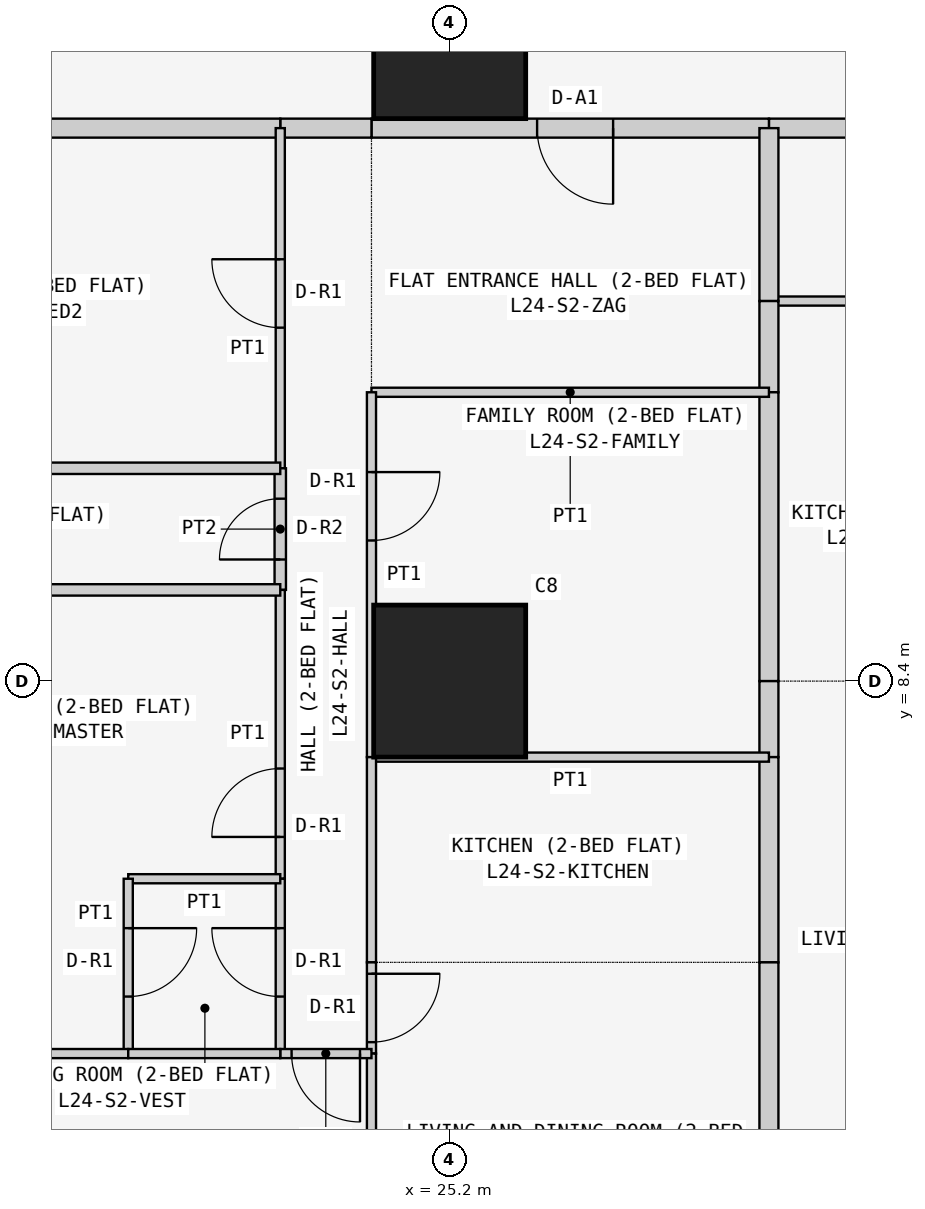
"""IFC4 building model, lengths in metres.
Left out: names, types, materials, properties, quantities, classifications, styles, units other than length and angle.
Written with IfcOpenShell. Run it as: python <this file> out.ifc"""

import sys

from ifc_helpers import new_model, si_unit, direction, frame, frame_2d, origin, origin_2d, place, context, subcontext, project, spatial, rectangle, extrude, element, fill, save


model = new_model("IFC4")
c1 = context("Model", 3, precision=1e-05, world=origin(), true_north=direction((0.0, 1.0)))
c2 = subcontext(c1, "Body", "Model", "MODEL_VIEW")
j1 = project(units=[si_unit("LENGTHUNIT", "METRE"), si_unit("PLANEANGLEUNIT", "RADIAN")], contexts=[c1])
p1 = place(None, origin())
s1 = spatial("IfcSite", under=j1, at=p1, CompositionType="ELEMENT")
p2 = place(p1, origin())
s2 = spatial("IfcBuilding", under=s1, at=p2, CompositionType="ELEMENT")
p3 = place(p2, frame((0.0, 0.0, 95.7)))
s3 = spatial("IfcBuildingStorey", under=s2, at=p3, CompositionType="ELEMENT", Elevation=95.7)
for number, where, z_axis, x_axis in (
    (1, (25.2, 8.4, 0.0), (0.0, 0.0, 1.0), (1.0, 0.0, 0.0)),
    (2, (25.2, 16.8, 0.0), (0.0, 0.0, 1.0), (1.0, 0.0, 0.0)),
):
    element("IfcColumn", number, at=place(p3, frame(where, z_axis=z_axis, x_axis=x_axis)), inside=s3, PredefinedType="COLUMN", context=c2, shape_type="SweptSolid", body=[
        extrude(rectangle(XDim=2.0, YDim=2.0, at=origin_2d()), origin(), (0.0, 0.0, 1.0), 3.6),
    ])
p4 = place(p3, frame((36.5, 15.675, 0.0), z_axis=(0.0, 0.0, 1.0), x_axis=(-1.0, 0.0, 0.0)))
e3 = element("IfcWall", 3, at=p4, inside=s3, PredefinedType="PARTITIONING", context=c2, shape_type="SweptSolid", body=[
    extrude(rectangle(XDim=7.1, YDim=0.25, at=frame_2d((3.55, 0.0))), origin(), (0.0, 0.0, 1.0), 3.45),
])
p5 = place(p4, frame((4.1, 0.0, 0.0)))
e4 = element("IfcOpeningElement", 4, at=p5, cuts=e3, PredefinedType="OPENING", context=c2, shape_type="SweptSolid", body=[
    extrude(rectangle(XDim=1.0, YDim=2.1, at=frame_2d((0.5, 1.05))), frame((0.0, 0.135, 0.0), z_axis=(0.0, -1.0, 0.0), x_axis=(1.0, 0.0, 0.0)), (0.0, 0.0, 1.0), 0.27),
])
p6 = place(p3, frame((29.4, 15.675, 0.0), z_axis=(0.0, 0.0, 1.0), x_axis=(-1.0, 0.0, 0.0)))
e5 = element("IfcWall", 5, at=p6, inside=s3, PredefinedType="PARTITIONING", context=c2, shape_type="SweptSolid", body=[
    extrude(rectangle(XDim=5.229, YDim=0.25, at=frame_2d((2.615, 0.0))), origin(), (0.0, 0.0, 1.0), 3.45),
])
p7 = place(p6, frame((2.05, 0.0, 0.0)))
e6 = element("IfcOpeningElement", 6, at=p7, cuts=e5, PredefinedType="OPENING", context=c2, shape_type="SweptSolid", body=[
    extrude(rectangle(XDim=1.0, YDim=2.1, at=frame_2d((0.5, 1.05))), frame((0.0, 0.135, 0.0), z_axis=(0.0, -1.0, 0.0), x_axis=(1.0, 0.0, 0.0)), (0.0, 0.0, 1.0), 0.27),
])
p8 = place(p3, frame((24.171, 15.675, 0.0), z_axis=(0.0, 0.0, 1.0), x_axis=(-1.0, 0.0, 0.0)))
e7 = element("IfcWall", 7, at=p8, inside=s3, PredefinedType="PARTITIONING", context=c2, shape_type="SweptSolid", body=[
    extrude(rectangle(XDim=1.2, YDim=0.25, at=frame_2d((0.6, 0.0))), origin(), (0.0, 0.0, 1.0), 3.45),
])
p9 = place(p3, frame((22.971, 15.675, 0.0), z_axis=(0.0, 0.0, 1.0), x_axis=(-1.0, 0.0, 0.0)))
e8 = element("IfcWall", 8, at=p9, inside=s3, PredefinedType="PARTITIONING", context=c2, shape_type="SweptSolid", body=[
    extrude(rectangle(XDim=6.871, YDim=0.25, at=frame_2d((3.436, 0.0))), origin(), (0.0, 0.0, 1.0), 3.45),
])
p10 = place(p3, frame((29.4, 13.4, 0.0), z_axis=(0.0, 0.0, 1.0), x_axis=(1.0, 0.0, 0.0)))
e9 = element("IfcWall", 9, at=p10, inside=s3, PredefinedType="PARTITIONING", context=c2, shape_type="SweptSolid", body=[
    extrude(rectangle(XDim=4.0, YDim=0.12, at=frame_2d((2.0, 0.0))), origin(), (0.0, 0.0, 1.0), 3.45),
])
p11 = place(p10, frame((1.05, 0.0, 0.0)))
e10 = element("IfcOpeningElement", 10, at=p11, cuts=e9, PredefinedType="OPENING", context=c2, shape_type="SweptSolid", body=[
    extrude(rectangle(XDim=0.9, YDim=2.1, at=frame_2d((0.45, 1.05))), frame((0.0, 0.07, 0.0), z_axis=(0.0, -1.0, 0.0), x_axis=(1.0, 0.0, 0.0)), (0.0, 0.0, 1.0), 0.14),
])
p12 = place(p3, frame((29.4, 15.675, 0.0), z_axis=(0.0, 0.0, 1.0), x_axis=(0.0, -1.0, 0.0)))
e11 = element("IfcWall", 11, at=p12, inside=s3, PredefinedType="PARTITIONING", context=c2, shape_type="SweptSolid", body=[
    extrude(rectangle(XDim=2.275, YDim=0.25, at=frame_2d((1.138, 0.0))), origin(), (0.0, 0.0, 1.0), 2.848),
])
p13 = place(p3, frame((29.4, 12.2, 0.0), z_axis=(0.0, 0.0, 1.0), x_axis=(0.0, 1.0, 0.0)))
e12 = element("IfcWall", 12, at=p13, inside=s3, PredefinedType="PARTITIONING", context=c2, shape_type="SweptSolid", body=[
    extrude(rectangle(XDim=1.2, YDim=0.25, at=frame_2d((0.6, 0.0))), origin(), (0.0, 0.0, 1.0), 2.848),
])
p14 = place(p3, frame((29.4, 8.4, 0.0), z_axis=(0.0, 0.0, 1.0), x_axis=(0.0, 1.0, 0.0)))
e13 = element("IfcWall", 13, at=p14, inside=s3, PredefinedType="PARTITIONING", context=c2, shape_type="SweptSolid", body=[
    extrude(rectangle(XDim=3.8, YDim=0.25, at=frame_2d((1.9, 0.0))), origin(), (0.0, 0.0, 1.0), 2.848),
])
p15 = place(p3, frame((29.4, 7.4, 0.0), z_axis=(0.0, 0.0, 1.0), x_axis=(0.0, 1.0, 0.0)))
e14 = element("IfcWall", 14, at=p15, inside=s3, PredefinedType="PARTITIONING", context=c2, shape_type="SweptSolid", body=[
    extrude(rectangle(XDim=1.0, YDim=0.25, at=frame_2d((0.5, 0.0))), origin(), (0.0, 0.0, 1.0), 2.848),
])
p16 = place(p3, frame((29.4, 4.7, 0.0), z_axis=(0.0, 0.0, 1.0), x_axis=(0.0, 1.0, 0.0)))
e15 = element("IfcWall", 15, at=p16, inside=s3, PredefinedType="PARTITIONING", context=c2, shape_type="SweptSolid", body=[
    extrude(rectangle(XDim=2.7, YDim=0.25, at=frame_2d((1.35, 0.0))), origin(), (0.0, 0.0, 1.0), 2.848),
])
p17 = place(p3, frame((29.4, -0.65, 0.0), z_axis=(0.0, 0.0, 1.0), x_axis=(0.0, 1.0, 0.0)))
e16 = element("IfcWall", 16, at=p17, inside=s3, PredefinedType="PARTITIONING", context=c2, shape_type="SweptSolid", body=[
    extrude(rectangle(XDim=5.35, YDim=0.25, at=frame_2d((2.675, 0.0))), origin(), (0.0, 0.0, 1.0), 2.848),
])
for number, where, z_axis, x_axis in (
    (17, (29.4, 12.2, 0.0), (0.0, 0.0, 1.0), (-1.0, 0.0, 0.0)),
    (18, (29.4, 7.4, 0.0), (0.0, 0.0, 1.0), (-1.0, 0.0, 0.0)),
):
    element("IfcWall", number, at=place(p3, frame(where, z_axis=z_axis, x_axis=x_axis)), inside=s3, PredefinedType="PARTITIONING", context=c2, shape_type="SweptSolid", body=[
        extrude(rectangle(XDim=5.229, YDim=0.12, at=frame_2d((2.615, 0.0))), origin(), (0.0, 0.0, 1.0), 3.45),
    ])
p18 = place(p3, frame((24.171, 7.4, 0.0), z_axis=(0.0, 0.0, 1.0), x_axis=(0.0, 1.0, 0.0)))
e19 = element("IfcWall", 19, at=p18, inside=s3, PredefinedType="PARTITIONING", context=c2, shape_type="SweptSolid", body=[
    extrude(rectangle(XDim=4.8, YDim=0.12, at=frame_2d((2.4, 0.0))), origin(), (0.0, 0.0, 1.0), 3.45),
])
p19 = place(p18, frame((2.85, 0.0, 0.0)))
e20 = element("IfcOpeningElement", 20, at=p19, cuts=e19, PredefinedType="OPENING", context=c2, shape_type="SweptSolid", body=[
    extrude(rectangle(XDim=0.9, YDim=2.1, at=frame_2d((0.45, 1.05))), frame((0.0, 0.07, 0.0), z_axis=(0.0, -1.0, 0.0), x_axis=(1.0, 0.0, 0.0)), (0.0, 0.0, 1.0), 0.14),
])
p20 = place(p3, frame((24.171, 4.7, 0.0), z_axis=(0.0, 0.0, 1.0), x_axis=(0.0, 1.0, 0.0)))
e21 = element("IfcWall", 21, at=p20, inside=s3, PredefinedType="PARTITIONING", context=c2, shape_type="SweptSolid", body=[
    extrude(rectangle(XDim=2.7, YDim=0.12, at=frame_2d((1.35, 0.0))), origin(), (0.0, 0.0, 1.0), 3.45),
])
p21 = place(p3, frame((24.171, 3.5, 0.0), z_axis=(0.0, 0.0, 1.0), x_axis=(0.0, 1.0, 0.0)))
e22 = element("IfcWall", 22, at=p21, inside=s3, PredefinedType="PARTITIONING", context=c2, shape_type="SweptSolid", body=[
    extrude(rectangle(XDim=1.2, YDim=0.12, at=frame_2d((0.6, 0.0))), origin(), (0.0, 0.0, 1.0), 3.45),
])
p22 = place(p21, frame((0.15, 0.0, 0.0)))
e23 = element("IfcOpeningElement", 23, at=p22, cuts=e22, PredefinedType="OPENING", context=c2, shape_type="SweptSolid", body=[
    extrude(rectangle(XDim=0.9, YDim=2.1, at=frame_2d((0.45, 1.05))), frame((0.0, 0.07, 0.0), z_axis=(0.0, -1.0, 0.0), x_axis=(1.0, 0.0, 0.0)), (0.0, 0.0, 1.0), 0.14),
])
p23 = place(p3, frame((24.171, -0.65, 0.0), z_axis=(0.0, 0.0, 1.0), x_axis=(0.0, 1.0, 0.0)))
e24 = element("IfcWall", 24, at=p23, inside=s3, PredefinedType="PARTITIONING", context=c2, shape_type="SweptSolid", body=[
    extrude(rectangle(XDim=4.15, YDim=0.12, at=frame_2d((2.075, 0.0))), origin(), (0.0, 0.0, 1.0), 3.45),
])
p24 = place(p3, frame((22.971, 11.2, 0.0), z_axis=(0.0, 0.0, 1.0), x_axis=(0.0, 1.0, 0.0)))
e25 = element("IfcWall", 25, at=p24, inside=s3, PredefinedType="PARTITIONING", context=c2, shape_type="SweptSolid", body=[
    extrude(rectangle(XDim=4.475, YDim=0.12, at=frame_2d((2.238, 0.0))), origin(), (0.0, 0.0, 1.0), 3.45),
])
p25 = place(p24, frame((1.85, 0.0, 0.0)))
e26 = element("IfcOpeningElement", 26, at=p25, cuts=e25, PredefinedType="OPENING", context=c2, shape_type="SweptSolid", body=[
    extrude(rectangle(XDim=0.9, YDim=2.1, at=frame_2d((0.45, 1.05))), frame((0.0, 0.07, 0.0), z_axis=(0.0, -1.0, 0.0), x_axis=(1.0, 0.0, 0.0)), (0.0, 0.0, 1.0), 0.14),
])
p26 = place(p3, frame((22.971, 9.6, 0.0), z_axis=(0.0, 0.0, 1.0), x_axis=(0.0, 1.0, 0.0)))
e27 = element("IfcWall", 27, at=p26, inside=s3, PredefinedType="PARTITIONING", context=c2, shape_type="SweptSolid", body=[
    extrude(rectangle(XDim=1.6, YDim=0.15, at=frame_2d((0.8, 0.0))), origin(), (0.0, 0.0, 1.0), 3.45),
])
p27 = place(p26, frame((0.4, 0.0, 0.0)))
e28 = element("IfcOpeningElement", 28, at=p27, cuts=e27, PredefinedType="OPENING", context=c2, shape_type="SweptSolid", body=[
    extrude(rectangle(XDim=0.8, YDim=2.1, at=frame_2d((0.4, 1.05))), frame((0.0, 0.085, 0.0), z_axis=(0.0, -1.0, 0.0), x_axis=(1.0, 0.0, 0.0)), (0.0, 0.0, 1.0), 0.17),
])
p28 = place(p3, frame((22.971, 5.8, 0.0), z_axis=(0.0, 0.0, 1.0), x_axis=(0.0, 1.0, 0.0)))
e29 = element("IfcWall", 29, at=p28, inside=s3, PredefinedType="PARTITIONING", context=c2, shape_type="SweptSolid", body=[
    extrude(rectangle(XDim=3.8, YDim=0.12, at=frame_2d((1.9, 0.0))), origin(), (0.0, 0.0, 1.0), 3.45),
])
p29 = place(p28, frame((0.55, 0.0, 0.0)))
e30 = element("IfcOpeningElement", 30, at=p29, cuts=e29, PredefinedType="OPENING", context=c2, shape_type="SweptSolid", body=[
    extrude(rectangle(XDim=0.9, YDim=2.1, at=frame_2d((0.45, 1.05))), frame((0.0, 0.07, 0.0), z_axis=(0.0, -1.0, 0.0), x_axis=(1.0, 0.0, 0.0)), (0.0, 0.0, 1.0), 0.14),
])
p30 = place(p3, frame((22.971, 3.5, 0.0), z_axis=(0.0, 0.0, 1.0), x_axis=(0.0, 1.0, 0.0)))
e31 = element("IfcWall", 31, at=p30, inside=s3, PredefinedType="PARTITIONING", context=c2, shape_type="SweptSolid", body=[
    extrude(rectangle(XDim=2.3, YDim=0.12, at=frame_2d((1.15, 0.0))), origin(), (0.0, 0.0, 1.0), 3.45),
])
p31 = place(p30, frame((0.75, 0.0, 0.0)))
e32 = element("IfcOpeningElement", 32, at=p31, cuts=e31, PredefinedType="OPENING", context=c2, shape_type="SweptSolid", body=[
    extrude(rectangle(XDim=0.9, YDim=2.1, at=frame_2d((0.45, 1.05))), frame((0.0, 0.07, 0.0), z_axis=(0.0, -1.0, 0.0), x_axis=(1.0, 0.0, 0.0)), (0.0, 0.0, 1.0), 0.14),
])
p32 = place(p3, frame((24.171, 3.5, 0.0), z_axis=(0.0, 0.0, 1.0), x_axis=(-1.0, 0.0, 0.0)))
e33 = element("IfcWall", 33, at=p32, inside=s3, PredefinedType="PARTITIONING", context=c2, shape_type="SweptSolid", body=[
    extrude(rectangle(XDim=1.2, YDim=0.12, at=frame_2d((0.6, 0.0))), origin(), (0.0, 0.0, 1.0), 3.45),
])
p33 = place(p32, frame((0.151, 0.0, 0.0)))
e34 = element("IfcOpeningElement", 34, at=p33, cuts=e33, PredefinedType="OPENING", context=c2, shape_type="SweptSolid", body=[
    extrude(rectangle(XDim=0.9, YDim=2.1, at=frame_2d((0.45, 1.05))), frame((0.0, 0.07, 0.0), z_axis=(0.0, -1.0, 0.0), x_axis=(1.0, 0.0, 0.0)), (0.0, 0.0, 1.0), 0.14),
])
for number, where, z_axis, x_axis in (
    (35, (22.971, 11.2, 0.0), (0.0, 0.0, 1.0), (-1.0, 0.0, 0.0)),
    (36, (22.971, 9.6, 0.0), (0.0, 0.0, 1.0), (-1.0, 0.0, 0.0)),
):
    element("IfcWall", number, at=place(p3, frame(where, z_axis=z_axis, x_axis=x_axis)), inside=s3, PredefinedType="PARTITIONING", context=c2, shape_type="SweptSolid", body=[
        extrude(rectangle(XDim=6.871, YDim=0.15, at=frame_2d((3.436, 0.0))), origin(), (0.0, 0.0, 1.0), 3.45),
    ])
p34 = place(p3, frame((22.971, 5.8, 0.0), z_axis=(0.0, 0.0, 1.0), x_axis=(-1.0, 0.0, 0.0)))
e37 = element("IfcWall", 37, at=p34, inside=s3, PredefinedType="PARTITIONING", context=c2, shape_type="SweptSolid", body=[
    extrude(rectangle(XDim=2.0, YDim=0.12, at=frame_2d((1.0, 0.0))), origin(), (0.0, 0.0, 1.0), 3.45),
])
p35 = place(p3, frame((20.971, 5.8, 0.0), z_axis=(0.0, 0.0, 1.0), x_axis=(0.0, -1.0, 0.0)))
e38 = element("IfcWall", 38, at=p35, inside=s3, PredefinedType="PARTITIONING", context=c2, shape_type="SweptSolid", body=[
    extrude(rectangle(XDim=2.3, YDim=0.12, at=frame_2d((1.15, 0.0))), origin(), (0.0, 0.0, 1.0), 2.848),
])
p36 = place(p35, frame((0.65, 0.0, 0.0)))
e39 = element("IfcOpeningElement", 39, at=p36, cuts=e38, PredefinedType="OPENING", context=c2, shape_type="SweptSolid", body=[
    extrude(rectangle(XDim=0.9, YDim=2.1, at=frame_2d((0.45, 1.05))), frame((0.0, 0.07, 0.0), z_axis=(0.0, -1.0, 0.0), x_axis=(1.0, 0.0, 0.0)), (0.0, 0.0, 1.0), 0.14),
])
p37 = place(p3, frame((20.971, 3.5, 0.0), z_axis=(0.0, 0.0, 1.0), x_axis=(-1.0, 0.0, 0.0)))
e40 = element("IfcWall", 40, at=p37, inside=s3, PredefinedType="PARTITIONING", context=c2, shape_type="SweptSolid", body=[
    extrude(rectangle(XDim=4.871, YDim=0.12, at=frame_2d((2.436, 0.0))), origin(), (0.0, 0.0, 1.0), 3.45),
])
p38 = place(p3, frame((22.971, 3.5, 0.0), z_axis=(0.0, 0.0, 1.0), x_axis=(-1.0, 0.0, 0.0)))
e41 = element("IfcWall", 41, at=p38, inside=s3, PredefinedType="PARTITIONING", context=c2, shape_type="SweptSolid", body=[
    extrude(rectangle(XDim=2.0, YDim=0.12, at=frame_2d((1.0, 0.0))), origin(), (0.0, 0.0, 1.0), 3.45),
])
p39 = place(p7, origin())
e42 = element("IfcDoor", 42, at=p39, inside=s3, OperationType="SINGLE_SWING_LEFT", PredefinedType="DOOR", context=c2, shape_type="SweptSolid", body=[
    extrude(rectangle(XDim=1.0, YDim=2.1, at=frame_2d((0.5, 1.05))), frame((0.0, 0.025, 0.0), z_axis=(0.0, -1.0, 0.0), x_axis=(1.0, 0.0, 0.0)), (0.0, 0.0, 1.0), 0.05),
])
fill(e6, e42)
p40 = place(p19, frame((0.9, 0.0, 0.0), z_axis=(0.0, 0.0, 1.0), x_axis=(-1.0, 0.0, 0.0)))
e43 = element("IfcDoor", 43, at=p40, inside=s3, OperationType="SINGLE_SWING_LEFT", PredefinedType="DOOR", context=c2, shape_type="SweptSolid", body=[
    extrude(rectangle(XDim=0.9, YDim=2.1, at=frame_2d((0.45, 1.05))), frame((0.0, 0.025, 0.0), z_axis=(0.0, -1.0, 0.0), x_axis=(1.0, 0.0, 0.0)), (0.0, 0.0, 1.0), 0.05),
])
fill(e20, e43)
p41 = place(p22, frame((0.9, 0.0, 0.0), z_axis=(0.0, 0.0, 1.0), x_axis=(-1.0, 0.0, 0.0)))
e44 = element("IfcDoor", 44, at=p41, inside=s3, OperationType="SINGLE_SWING_LEFT", PredefinedType="DOOR", context=c2, shape_type="SweptSolid", body=[
    extrude(rectangle(XDim=0.9, YDim=2.1, at=frame_2d((0.45, 1.05))), frame((0.0, 0.025, 0.0), z_axis=(0.0, -1.0, 0.0), x_axis=(1.0, 0.0, 0.0)), (0.0, 0.0, 1.0), 0.05),
])
fill(e23, e44)
p42 = place(p25, origin())
e45 = element("IfcDoor", 45, at=p42, inside=s3, OperationType="SINGLE_SWING_RIGHT", PredefinedType="DOOR", context=c2, shape_type="SweptSolid", body=[
    extrude(rectangle(XDim=0.9, YDim=2.1, at=frame_2d((0.45, 1.05))), frame((0.0, 0.025, 0.0), z_axis=(0.0, -1.0, 0.0), x_axis=(1.0, 0.0, 0.0)), (0.0, 0.0, 1.0), 0.05),
])
fill(e26, e45)
p43 = place(p27, origin())
e46 = element("IfcDoor", 46, at=p43, inside=s3, OperationType="SINGLE_SWING_LEFT", PredefinedType="DOOR", context=c2, shape_type="SweptSolid", body=[
    extrude(rectangle(XDim=0.8, YDim=2.1, at=frame_2d((0.4, 1.05))), frame((0.0, 0.025, 0.0), z_axis=(0.0, -1.0, 0.0), x_axis=(1.0, 0.0, 0.0)), (0.0, 0.0, 1.0), 0.05),
])
fill(e28, e46)
p44 = place(p29, origin())
e47 = element("IfcDoor", 47, at=p44, inside=s3, OperationType="SINGLE_SWING_LEFT", PredefinedType="DOOR", context=c2, shape_type="SweptSolid", body=[
    extrude(rectangle(XDim=0.9, YDim=2.1, at=frame_2d((0.45, 1.05))), frame((0.0, 0.025, 0.0), z_axis=(0.0, -1.0, 0.0), x_axis=(1.0, 0.0, 0.0)), (0.0, 0.0, 1.0), 0.05),
])
fill(e30, e47)
p45 = place(p31, origin())
e48 = element("IfcDoor", 48, at=p45, inside=s3, OperationType="SINGLE_SWING_RIGHT", PredefinedType="DOOR", context=c2, shape_type="SweptSolid", body=[
    extrude(rectangle(XDim=0.9, YDim=2.1, at=frame_2d((0.45, 1.05))), frame((0.0, 0.025, 0.0), z_axis=(0.0, -1.0, 0.0), x_axis=(1.0, 0.0, 0.0)), (0.0, 0.0, 1.0), 0.05),
])
fill(e32, e48)
p46 = place(p36, origin())
e49 = element("IfcDoor", 49, at=p46, inside=s3, OperationType="SINGLE_SWING_LEFT", PredefinedType="DOOR", context=c2, shape_type="SweptSolid", body=[
    extrude(rectangle(XDim=0.9, YDim=2.1, at=frame_2d((0.45, 1.05))), frame((0.0, 0.025, 0.0), z_axis=(0.0, -1.0, 0.0), x_axis=(1.0, 0.0, 0.0)), (0.0, 0.0, 1.0), 0.05),
])
fill(e39, e49)
p47 = place(p33, origin())
e50 = element("IfcDoor", 50, at=p47, inside=s3, OperationType="SINGLE_SWING_LEFT", PredefinedType="DOOR", context=c2, shape_type="SweptSolid", body=[
    extrude(rectangle(XDim=0.9, YDim=2.1, at=frame_2d((0.45, 1.05))), frame((0.0, 0.025, 0.0), z_axis=(0.0, -1.0, 0.0), x_axis=(1.0, 0.0, 0.0)), (0.0, 0.0, 1.0), 0.05),
])
fill(e34, e50)
save(model, sys.argv[1])
